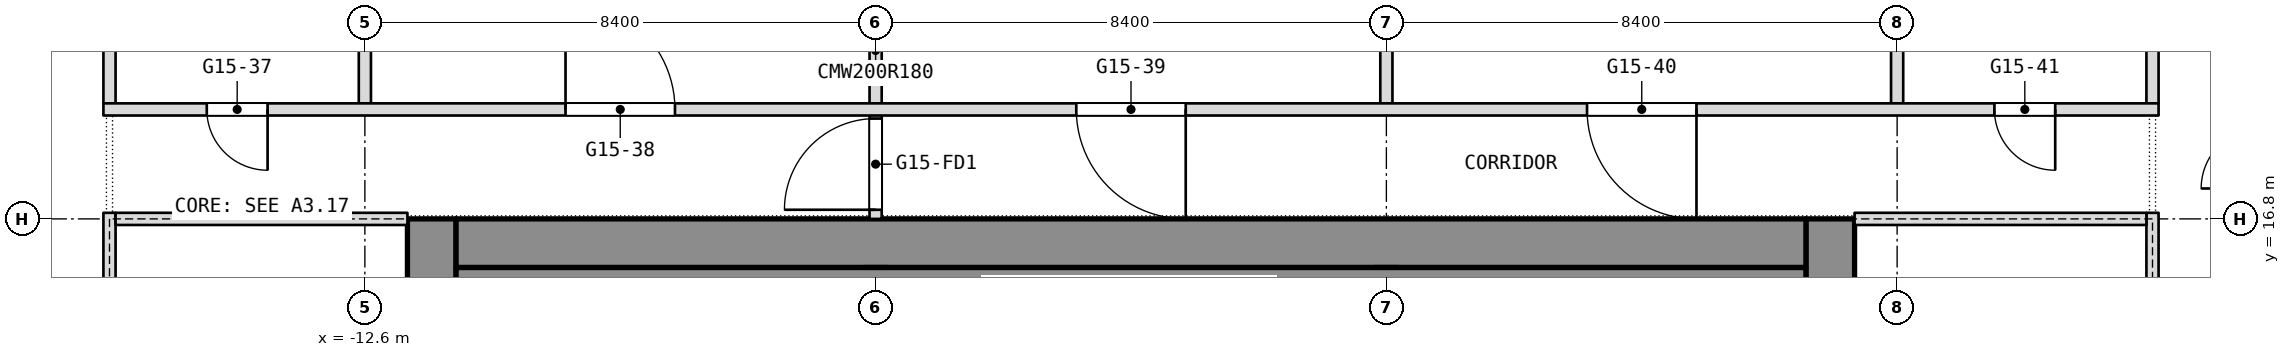
"""IFC4 building model, lengths in metres.
Left out: names, types, materials, properties, quantities, classifications, styles, units other than length and angle.
Written with IfcOpenShell. Run it as: python <this file> out.ifc"""

import sys

from ifc_helpers import new_model, si_unit, direction, frame, frame_2d, origin, place, context, subcontext, project, spatial, rectangle, extrude, element, fill, save


model = new_model("IFC4")
c1 = context("Model", 3, precision=1e-05, world=origin(), true_north=direction((0.0, 1.0)))
c2 = subcontext(c1, "Body", "Model", "MODEL_VIEW")
j1 = project(units=[si_unit("LENGTHUNIT", "METRE"), si_unit("PLANEANGLEUNIT", "RADIAN")], contexts=[c1])
p1 = place(None, origin())
s1 = spatial("IfcSite", under=j1, at=p1, CompositionType="ELEMENT")
p2 = place(p1, origin())
s2 = spatial("IfcBuilding", under=s1, at=p2, CompositionType="ELEMENT")
p3 = place(p2, frame((0.0, 0.0, 191.3)))
s3 = spatial("IfcBuildingStorey", under=s2, at=p3, CompositionType="ELEMENT", Elevation=191.3)
p4 = place(p3, frame((11.5, 0.0, 0.0), z_axis=(0.0, 0.0, 1.0), x_axis=(0.0, 1.0, 0.0)))
e1 = element("IfcWall", 1, at=p4, inside=s3, PredefinedType="SHEAR", context=c2, shape_type="SweptSolid", body=[
    extrude(rectangle(XDim=16.8, YDim=0.8, at=frame_2d((8.4, 0.0))), origin(), (0.0, 0.0, 1.0), 3.6),
])
p5 = place(p4, frame((2.3, 0.0, 0.0)))
e2 = element("IfcOpeningElement", 2, at=p5, cuts=e1, PredefinedType="OPENING", context=c2, shape_type="SweptSolid", body=[
    extrude(rectangle(XDim=1.1, YDim=2.1, at=frame_2d((0.55, 1.05))), frame((0.0, 0.4, 0.0), z_axis=(0.0, -1.0, 0.0), x_axis=(1.0, 0.0, 0.0)), (0.0, 0.0, 1.0), 0.8),
])
p6 = place(p4, frame((4.85, 0.0, 0.0)))
e3 = element("IfcOpeningElement", 3, at=p6, cuts=e1, PredefinedType="OPENING", context=c2, shape_type="SweptSolid", body=[
    extrude(rectangle(XDim=1.1, YDim=2.1, at=frame_2d((0.55, 1.05))), frame((0.0, 0.4, 0.0), z_axis=(0.0, -1.0, 0.0), x_axis=(1.0, 0.0, 0.0)), (0.0, 0.0, 1.0), 0.8),
])
p7 = place(p4, frame((6.825, 0.0, 0.0)))
e4 = element("IfcOpeningElement", 4, at=p7, cuts=e1, PredefinedType="OPENING", context=c2, shape_type="SweptSolid", body=[
    extrude(rectangle(XDim=1.2, YDim=2.1, at=frame_2d((0.6, 1.05))), frame((0.0, 0.4, 0.0), z_axis=(0.0, -1.0, 0.0), x_axis=(1.0, 0.0, 0.0)), (0.0, 0.0, 1.0), 0.8),
])
p8 = place(p4, frame((13.4, 0.0, 0.0)))
e5 = element("IfcOpeningElement", 5, at=p8, cuts=e1, PredefinedType="OPENING", context=c2, shape_type="SweptSolid", body=[
    extrude(rectangle(XDim=1.1, YDim=2.1, at=frame_2d((0.55, 1.05))), frame((0.0, 0.4, 0.0), z_axis=(0.0, -1.0, 0.0), x_axis=(1.0, 0.0, 0.0)), (0.0, 0.0, 1.0), 0.8),
])
p9 = place(p4, frame((10.85, 0.0, 0.0)))
e6 = element("IfcOpeningElement", 6, at=p9, cuts=e1, PredefinedType="OPENING", context=c2, shape_type="SweptSolid", body=[
    extrude(rectangle(XDim=1.1, YDim=2.1, at=frame_2d((0.55, 1.05))), frame((0.0, 0.4, 0.0), z_axis=(0.0, -1.0, 0.0), x_axis=(1.0, 0.0, 0.0)), (0.0, 0.0, 1.0), 0.8),
])
p10 = place(p4, frame((8.775, 0.0, 0.0)))
e7 = element("IfcOpeningElement", 7, at=p10, cuts=e1, PredefinedType="OPENING", context=c2, shape_type="SweptSolid", body=[
    extrude(rectangle(XDim=1.2, YDim=2.1, at=frame_2d((0.6, 1.05))), frame((0.0, 0.4, 0.0), z_axis=(0.0, -1.0, 0.0), x_axis=(1.0, 0.0, 0.0)), (0.0, 0.0, 1.0), 0.8),
])
p11 = place(p3, frame((-11.5, 0.0, 0.0), z_axis=(0.0, 0.0, 1.0), x_axis=(0.0, 1.0, 0.0)))
e8 = element("IfcWall", 8, at=p11, inside=s3, PredefinedType="SHEAR", context=c2, shape_type="SweptSolid", body=[
    extrude(rectangle(XDim=16.8, YDim=0.8, at=frame_2d((8.4, 0.0))), origin(), (0.0, 0.0, 1.0), 3.6),
])
p12 = place(p11, frame((3.6, 0.0, 0.0)))
e9 = element("IfcOpeningElement", 9, at=p12, cuts=e8, PredefinedType="OPENING", context=c2, shape_type="SweptSolid", body=[
    extrude(rectangle(XDim=0.9, YDim=2.1, at=frame_2d((0.45, 1.05))), frame((0.0, 0.4, 0.0), z_axis=(0.0, -1.0, 0.0), x_axis=(1.0, 0.0, 0.0)), (0.0, 0.0, 1.0), 0.8),
])
p13 = place(p11, frame((6.825, 0.0, 0.0)))
e10 = element("IfcOpeningElement", 10, at=p13, cuts=e8, PredefinedType="OPENING", context=c2, shape_type="SweptSolid", body=[
    extrude(rectangle(XDim=1.2, YDim=2.1, at=frame_2d((0.6, 1.05))), frame((0.0, 0.4, 0.0), z_axis=(0.0, -1.0, 0.0), x_axis=(1.0, 0.0, 0.0)), (0.0, 0.0, 1.0), 0.8),
])
p14 = place(p11, frame((14.212, 0.0, 0.0)))
e11 = element("IfcOpeningElement", 11, at=p14, cuts=e8, PredefinedType="OPENING", context=c2, shape_type="SweptSolid", body=[
    extrude(rectangle(XDim=0.9, YDim=2.1, at=frame_2d((0.45, 1.05))), frame((0.0, 0.4, 0.0), z_axis=(0.0, -1.0, 0.0), x_axis=(1.0, 0.0, 0.0)), (0.0, 0.0, 1.0), 0.8),
])
p15 = place(p11, frame((11.587, 0.0, 0.0)))
e12 = element("IfcOpeningElement", 12, at=p15, cuts=e8, PredefinedType="OPENING", context=c2, shape_type="SweptSolid", body=[
    extrude(rectangle(XDim=0.9, YDim=2.1, at=frame_2d((0.45, 1.05))), frame((0.0, 0.4, 0.0), z_axis=(0.0, -1.0, 0.0), x_axis=(1.0, 0.0, 0.0)), (0.0, 0.0, 1.0), 0.8),
])
p16 = place(p11, frame((8.775, 0.0, 0.0)))
e13 = element("IfcOpeningElement", 13, at=p16, cuts=e8, PredefinedType="OPENING", context=c2, shape_type="SweptSolid", body=[
    extrude(rectangle(XDim=1.2, YDim=2.1, at=frame_2d((0.6, 1.05))), frame((0.0, 0.4, 0.0), z_axis=(0.0, -1.0, 0.0), x_axis=(1.0, 0.0, 0.0)), (0.0, 0.0, 1.0), 0.8),
])
p17 = place(p3, frame((-11.1, 16.4, 0.0), z_axis=(0.0, 0.0, 1.0), x_axis=(1.0, 0.0, 0.0)))
e14 = element("IfcWall", 14, at=p17, inside=s3, PredefinedType="SHEAR", context=c2, shape_type="SweptSolid", body=[
    extrude(rectangle(XDim=22.2, YDim=0.8, at=frame_2d((11.1, 0.0))), origin(), (0.0, 0.0, 1.0), 3.6),
])
p18 = place(p3, frame((-4.2, 0.8, 0.0), z_axis=(0.0, 0.0, 1.0), x_axis=(0.0, 1.0, 0.0)))
e15 = element("IfcWall", 15, at=p18, inside=s3, PredefinedType="SHEAR", context=c2, shape_type="SweptSolid", body=[
    extrude(rectangle(XDim=15.2, YDim=0.4, at=frame_2d((7.6, 0.0))), origin(), (0.0, 0.0, 1.0), 3.6),
])
p19 = place(p18, frame((8.5, 0.0, 0.0)))
e16 = element("IfcOpeningElement", 16, at=p19, cuts=e15, PredefinedType="OPENING", context=c2, shape_type="SweptSolid", body=[
    extrude(rectangle(XDim=1.2, YDim=2.1, at=frame_2d((0.6, 1.05))), frame((0.0, 0.2, 0.0), z_axis=(0.0, -1.0, 0.0), x_axis=(1.0, 0.0, 0.0)), (0.0, 0.0, 1.0), 0.4),
])
p20 = place(p3, frame((4.2, 0.8, 0.0), z_axis=(0.0, 0.0, 1.0), x_axis=(0.0, 1.0, 0.0)))
e17 = element("IfcWall", 17, at=p20, inside=s3, PredefinedType="SHEAR", context=c2, shape_type="SweptSolid", body=[
    extrude(rectangle(XDim=15.2, YDim=0.4, at=frame_2d((7.6, 0.0))), origin(), (0.0, 0.0, 1.0), 3.6),
])
p21 = place(p20, frame((5.95, 0.0, 0.0)))
e18 = element("IfcOpeningElement", 18, at=p21, cuts=e17, PredefinedType="OPENING", context=c2, shape_type="SweptSolid", body=[
    extrude(rectangle(XDim=1.2, YDim=2.1, at=frame_2d((0.6, 1.05))), frame((0.0, 0.2, 0.0), z_axis=(0.0, -1.0, 0.0), x_axis=(1.0, 0.0, 0.0)), (0.0, 0.0, 1.0), 0.4),
])
for number, where, z_axis, x_axis in (
    (19, (16.8, 18.7, 0.0), (0.0, 0.0, 1.0), (0.0, 1.0, 0.0)),
    (20, (12.6, 18.7, 0.0), (0.0, 0.0, 1.0), (0.0, 1.0, 0.0)),
    (21, (4.2, 18.7, 0.0), (0.0, 0.0, 1.0), (0.0, 1.0, 0.0)),
):
    element("IfcWall", number, at=place(p3, frame(where, z_axis=z_axis, x_axis=x_axis)), inside=s3, PredefinedType="PARTITIONING", context=c2, shape_type="SweptSolid", body=[
        extrude(rectangle(XDim=3.64, YDim=0.2, at=frame_2d((1.82, 0.0))), origin(), (0.0, 0.0, 1.0), 3.34),
    ])
p22 = place(p3, frame((-4.2, 16.8, 0.0), z_axis=(0.0, 0.0, 1.0), x_axis=(0.0, 1.0, 0.0)))
e22 = element("IfcWall", 22, at=p22, inside=s3, PredefinedType="PARTITIONING", context=c2, shape_type="SweptSolid", body=[
    extrude(rectangle(XDim=5.54, YDim=0.2, at=frame_2d((2.77, 0.0))), origin(), (0.0, 0.0, 1.0), 3.34),
])
p23 = place(p22, frame((0.15, 0.0, 0.0)))
e23 = element("IfcOpeningElement", 23, at=p23, cuts=e22, PredefinedType="OPENING", context=c2, shape_type="SweptSolid", body=[
    extrude(rectangle(XDim=1.5, YDim=2.1, at=frame_2d((0.75, 1.05))), frame((0.0, 0.1, 0.0), z_axis=(0.0, -1.0, 0.0), x_axis=(1.0, 0.0, 0.0)), (0.0, 0.0, 1.0), 0.2),
])
for number, where, z_axis, x_axis in (
    (24, (-12.6, 18.7, 0.0), (0.0, 0.0, 1.0), (0.0, 1.0, 0.0)),
    (25, (-16.8, 18.7, 0.0), (0.0, 0.0, 1.0), (0.0, 1.0, 0.0)),
):
    element("IfcWall", number, at=place(p3, frame(where, z_axis=z_axis, x_axis=x_axis)), inside=s3, PredefinedType="PARTITIONING", context=c2, shape_type="SweptSolid", body=[
        extrude(rectangle(XDim=3.64, YDim=0.2, at=frame_2d((1.82, 0.0))), origin(), (0.0, 0.0, 1.0), 3.34),
    ])
p24 = place(p3, frame((-16.9, 18.6, 0.0), z_axis=(0.0, 0.0, 1.0), x_axis=(1.0, 0.0, 0.0)))
e26 = element("IfcWall", 26, at=p24, inside=s3, PredefinedType="PARTITIONING", context=c2, shape_type="SweptSolid", body=[
    extrude(rectangle(XDim=33.8, YDim=0.2, at=frame_2d((16.9, 0.0))), origin(), (0.0, 0.0, 1.0), 3.34),
])
p25 = place(p24, frame((1.7, 0.0, 0.0)))
e27 = element("IfcOpeningElement", 27, at=p25, cuts=e26, PredefinedType="OPENING", context=c2, shape_type="SweptSolid", body=[
    extrude(rectangle(XDim=1.0, YDim=2.1, at=frame_2d((0.5, 1.05))), frame((0.0, 0.1, 0.0), z_axis=(0.0, -1.0, 0.0), x_axis=(1.0, 0.0, 0.0)), (0.0, 0.0, 1.0), 0.2),
])
p26 = place(p24, frame((7.6, 0.0, 0.0)))
e28 = element("IfcOpeningElement", 28, at=p26, cuts=e26, PredefinedType="OPENING", context=c2, shape_type="SweptSolid", body=[
    extrude(rectangle(XDim=1.8, YDim=2.1, at=frame_2d((0.9, 1.05))), frame((0.0, 0.1, 0.0), z_axis=(0.0, -1.0, 0.0), x_axis=(1.0, 0.0, 0.0)), (0.0, 0.0, 1.0), 0.2),
])
p27 = place(p24, frame((16.0, 0.0, 0.0)))
e29 = element("IfcOpeningElement", 29, at=p27, cuts=e26, PredefinedType="OPENING", context=c2, shape_type="SweptSolid", body=[
    extrude(rectangle(XDim=1.8, YDim=2.1, at=frame_2d((0.9, 1.05))), frame((0.0, 0.1, 0.0), z_axis=(0.0, -1.0, 0.0), x_axis=(1.0, 0.0, 0.0)), (0.0, 0.0, 1.0), 0.2),
])
p28 = place(p24, frame((24.4, 0.0, 0.0)))
e30 = element("IfcOpeningElement", 30, at=p28, cuts=e26, PredefinedType="OPENING", context=c2, shape_type="SweptSolid", body=[
    extrude(rectangle(XDim=1.8, YDim=2.1, at=frame_2d((0.9, 1.05))), frame((0.0, 0.1, 0.0), z_axis=(0.0, -1.0, 0.0), x_axis=(1.0, 0.0, 0.0)), (0.0, 0.0, 1.0), 0.2),
])
p29 = place(p24, frame((31.1, 0.0, 0.0)))
e31 = element("IfcOpeningElement", 31, at=p29, cuts=e26, PredefinedType="OPENING", context=c2, shape_type="SweptSolid", body=[
    extrude(rectangle(XDim=1.0, YDim=2.1, at=frame_2d((0.5, 1.05))), frame((0.0, 0.1, 0.0), z_axis=(0.0, -1.0, 0.0), x_axis=(1.0, 0.0, 0.0)), (0.0, 0.0, 1.0), 0.2),
])
p30 = place(p3, frame((-11.1, 15.65, 0.0), z_axis=(0.0, 0.0, 1.0), x_axis=(1.0, 0.0, 0.0)))
e32 = element("IfcWall", 32, at=p30, inside=s3, PredefinedType="PARTITIONING", context=c2, shape_type="SweptSolid", body=[
    extrude(rectangle(XDim=22.2, YDim=0.7, at=frame_2d((11.1, 0.0))), origin(), (0.0, 0.0, 1.0), 3.34),
])
p31 = place(p3, frame((-16.8, -0.1, 0.0), z_axis=(0.0, 0.0, 1.0), x_axis=(0.0, 1.0, 0.0)))
e33 = element("IfcWall", 33, at=p31, inside=s3, PredefinedType="PARTITIONING", context=c2, shape_type="SweptSolid", body=[
    extrude(rectangle(XDim=17.0, YDim=0.2, at=frame_2d((8.5, 0.0))), origin(), (0.0, 0.0, 1.0), 3.34),
])
p32 = place(p31, frame((2.2, 0.0, 0.0)))
e34 = element("IfcOpeningElement", 34, at=p32, cuts=e33, PredefinedType="OPENING", context=c2, shape_type="SweptSolid", body=[
    extrude(rectangle(XDim=1.8, YDim=2.1, at=frame_2d((0.9, 1.05))), frame((0.0, 0.1, 0.0), z_axis=(0.0, -1.0, 0.0), x_axis=(1.0, 0.0, 0.0)), (0.0, 0.0, 1.0), 0.2),
])
p33 = place(p31, frame((13.0, 0.0, 0.0)))
e35 = element("IfcOpeningElement", 35, at=p33, cuts=e33, PredefinedType="OPENING", context=c2, shape_type="SweptSolid", body=[
    extrude(rectangle(XDim=1.8, YDim=2.1, at=frame_2d((0.9, 1.05))), frame((0.0, 0.1, 0.0), z_axis=(0.0, -1.0, 0.0), x_axis=(1.0, 0.0, 0.0)), (0.0, 0.0, 1.0), 0.2),
])
p34 = place(p3, frame((-16.7, 16.8, 0.0), z_axis=(0.0, 0.0, 1.0), x_axis=(1.0, 0.0, 0.0)))
e36 = element("IfcWall", 36, at=p34, inside=s3, PredefinedType="PARTITIONING", context=c2, shape_type="SweptSolid", body=[
    extrude(rectangle(XDim=4.8, YDim=0.2, at=frame_2d((2.4, 0.0))), origin(), (0.0, 0.0, 1.0), 2.94),
])
p35 = place(p3, frame((16.8, -0.1, 0.0), z_axis=(0.0, 0.0, 1.0), x_axis=(0.0, 1.0, 0.0)))
e37 = element("IfcWall", 37, at=p35, inside=s3, PredefinedType="PARTITIONING", context=c2, shape_type="SweptSolid", body=[
    extrude(rectangle(XDim=17.0, YDim=0.2, at=frame_2d((8.5, 0.0))), origin(), (0.0, 0.0, 1.0), 3.34),
])
p36 = place(p35, frame((2.2, 0.0, 0.0)))
e38 = element("IfcOpeningElement", 38, at=p36, cuts=e37, PredefinedType="OPENING", context=c2, shape_type="SweptSolid", body=[
    extrude(rectangle(XDim=1.8, YDim=2.1, at=frame_2d((0.9, 1.05))), frame((0.0, 0.1, 0.0), z_axis=(0.0, -1.0, 0.0), x_axis=(1.0, 0.0, 0.0)), (0.0, 0.0, 1.0), 0.2),
])
p37 = place(p35, frame((13.0, 0.0, 0.0)))
e39 = element("IfcOpeningElement", 39, at=p37, cuts=e37, PredefinedType="OPENING", context=c2, shape_type="SweptSolid", body=[
    extrude(rectangle(XDim=1.8, YDim=2.1, at=frame_2d((0.9, 1.05))), frame((0.0, 0.1, 0.0), z_axis=(0.0, -1.0, 0.0), x_axis=(1.0, 0.0, 0.0)), (0.0, 0.0, 1.0), 0.2),
])
p38 = place(p3, frame((11.9, 16.8, 0.0), z_axis=(0.0, 0.0, 1.0), x_axis=(1.0, 0.0, 0.0)))
e40 = element("IfcWall", 40, at=p38, inside=s3, PredefinedType="PARTITIONING", context=c2, shape_type="SweptSolid", body=[
    extrude(rectangle(XDim=4.8, YDim=0.2, at=frame_2d((2.4, 0.0))), origin(), (0.0, 0.0, 1.0), 2.94),
])
p39 = place(p25, origin())
e41 = element("IfcDoor", 41, at=p39, inside=s3, OperationType="SINGLE_SWING_LEFT", PredefinedType="DOOR", context=c2, shape_type="SweptSolid", body=[
    extrude(rectangle(XDim=1.0, YDim=2.1, at=frame_2d((0.5, 1.05))), frame((0.0, 0.025, 0.0), z_axis=(0.0, -1.0, 0.0), x_axis=(1.0, 0.0, 0.0)), (0.0, 0.0, 1.0), 0.05),
])
fill(e27, e41)
p40 = place(p26, origin())
e42 = element("IfcDoor", 42, at=p40, inside=s3, OperationType="DOUBLE_DOOR_SINGLE_SWING", PredefinedType="DOOR", context=c2, shape_type="SweptSolid", body=[
    extrude(rectangle(XDim=1.8, YDim=2.1, at=frame_2d((0.9, 1.05))), frame((0.0, 0.025, 0.0), z_axis=(0.0, -1.0, 0.0), x_axis=(1.0, 0.0, 0.0)), (0.0, 0.0, 1.0), 0.05),
])
fill(e28, e42)
p41 = place(p27, origin())
e43 = element("IfcDoor", 43, at=p41, inside=s3, OperationType="DOUBLE_DOOR_SINGLE_SWING", PredefinedType="DOOR", context=c2, shape_type="SweptSolid", body=[
    extrude(rectangle(XDim=1.8, YDim=2.1, at=frame_2d((0.9, 1.05))), frame((0.0, 0.025, 0.0), z_axis=(0.0, -1.0, 0.0), x_axis=(1.0, 0.0, 0.0)), (0.0, 0.0, 1.0), 0.05),
])
fill(e29, e43)
p42 = place(p28, origin())
e44 = element("IfcDoor", 44, at=p42, inside=s3, OperationType="DOUBLE_DOOR_SINGLE_SWING", PredefinedType="DOOR", context=c2, shape_type="SweptSolid", body=[
    extrude(rectangle(XDim=1.8, YDim=2.1, at=frame_2d((0.9, 1.05))), frame((0.0, 0.025, 0.0), z_axis=(0.0, -1.0, 0.0), x_axis=(1.0, 0.0, 0.0)), (0.0, 0.0, 1.0), 0.05),
])
fill(e30, e44)
p43 = place(p29, origin())
e45 = element("IfcDoor", 45, at=p43, inside=s3, OperationType="SINGLE_SWING_LEFT", PredefinedType="DOOR", context=c2, shape_type="SweptSolid", body=[
    extrude(rectangle(XDim=1.0, YDim=2.1, at=frame_2d((0.5, 1.05))), frame((0.0, 0.025, 0.0), z_axis=(0.0, -1.0, 0.0), x_axis=(1.0, 0.0, 0.0)), (0.0, 0.0, 1.0), 0.05),
])
fill(e31, e45)
p44 = place(p23, origin())
e46 = element("IfcDoor", 46, at=p44, inside=s3, OperationType="DOUBLE_DOOR_DOUBLE_SWING", PredefinedType="DOOR", context=c2, shape_type="SweptSolid", body=[
    extrude(rectangle(XDim=1.5, YDim=2.1, at=frame_2d((0.75, 1.05))), frame((0.0, 0.025, 0.0), z_axis=(0.0, -1.0, 0.0), x_axis=(1.0, 0.0, 0.0)), (0.0, 0.0, 1.0), 0.05),
])
fill(e23, e46)
save(model, sys.argv[1])
